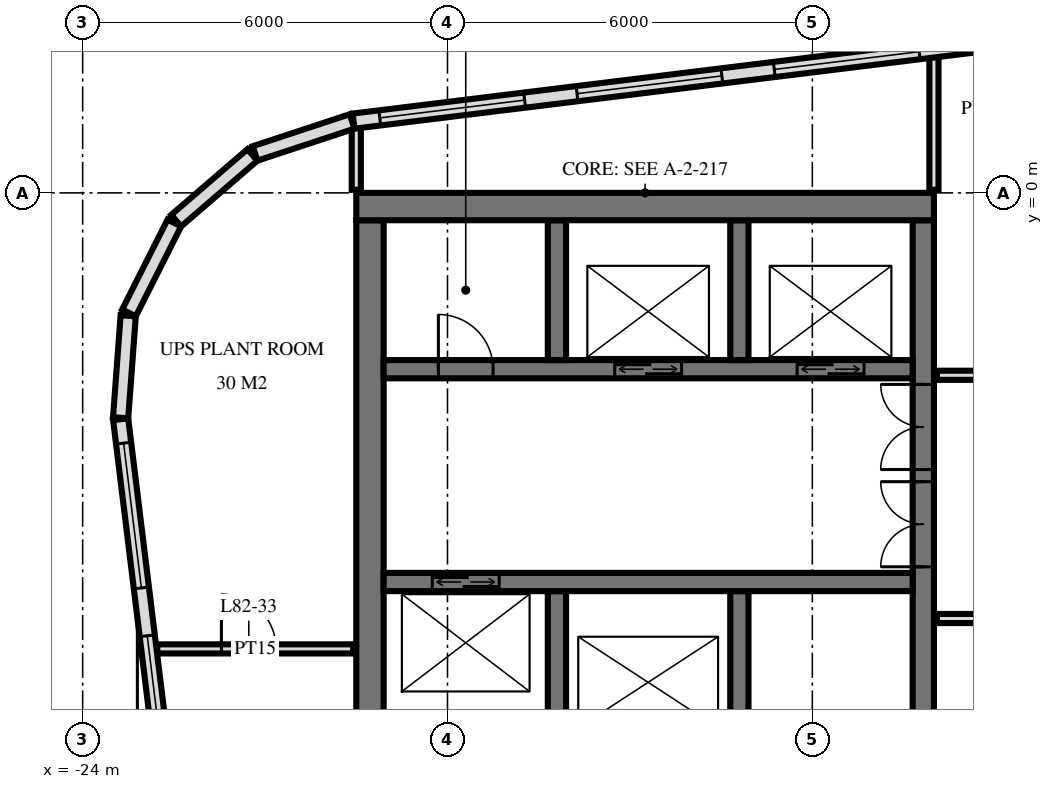
"""IFC4 building model, lengths in metres.
Left out: names, types, materials, properties, quantities, classifications, styles, units other than length and angle.
Written with IfcOpenShell. Run it as: python <this file> out.ifc"""

import sys

from ifc_helpers import new_model, si_unit, direction, frame, frame_2d, origin, place, context, subcontext, project, spatial, rectangle, extrude, element, fill, save


model = new_model("IFC4")
c1 = context("Model", 3, precision=1e-05, world=origin(), true_north=direction((0.0, 1.0)))
c2 = subcontext(c1, "Body", "Model", "MODEL_VIEW")
j1 = project(units=[si_unit("LENGTHUNIT", "METRE"), si_unit("PLANEANGLEUNIT", "RADIAN")], contexts=[c1])
p1 = place(None, origin())
s1 = spatial("IfcSite", under=j1, at=p1, CompositionType="ELEMENT")
p2 = place(p1, origin())
s2 = spatial("IfcBuilding", under=s1, at=p2, CompositionType="ELEMENT")
p3 = place(p2, frame((0.0, 0.0, 308.6)))
s3 = spatial("IfcBuildingStorey", under=s2, at=p3, CompositionType="ELEMENT", Elevation=308.6)
p4 = place(p3, frame((-19.5, -0.225, 0.0), z_axis=(0.0, 0.0, 1.0), x_axis=(1.0, 0.0, 0.0)))
e1 = element("IfcWall", 1, at=p4, inside=s3, PredefinedType="SHEAR", context=c2, shape_type="SweptSolid", body=[
    extrude(rectangle(XDim=9.5, YDim=0.45, at=frame_2d((4.75, 0.0))), origin(), (0.0, 0.0, 1.0), 6.0),
])
p5 = place(p3, frame((-10.175, -14.55, 0.0), z_axis=(0.0, 0.0, 1.0), x_axis=(0.0, 1.0, 0.0)))
e2 = element("IfcWall", 2, at=p5, inside=s3, PredefinedType="SHEAR", context=c2, shape_type="SweptSolid", body=[
    extrude(rectangle(XDim=14.1, YDim=0.35, at=frame_2d((7.05, 0.0))), origin(), (0.0, 0.0, 1.0), 6.0),
])
p6 = place(p5, frame((8.4, 0.0, 0.0)))
e3 = element("IfcOpeningElement", 3, at=p6, cuts=e2, PredefinedType="OPENING", context=c2, shape_type="SweptSolid", body=[
    extrude(rectangle(XDim=1.4, YDim=2.4, at=frame_2d((0.7, 1.2))), frame((0.0, 0.185, 0.0), z_axis=(0.0, -1.0, 0.0), x_axis=(1.0, 0.0, 0.0)), (0.0, 0.0, 1.0), 0.37),
])
p7 = place(p5, frame((10.0, 0.0, 0.0)))
e4 = element("IfcOpeningElement", 4, at=p7, cuts=e2, PredefinedType="OPENING", context=c2, shape_type="SweptSolid", body=[
    extrude(rectangle(XDim=1.4, YDim=2.4, at=frame_2d((0.7, 1.2))), frame((0.0, 0.185, 0.0), z_axis=(0.0, -1.0, 0.0), x_axis=(1.0, 0.0, 0.0)), (0.0, 0.0, 1.0), 0.37),
])
p8 = place(p5, frame((4.0, 0.0, 0.0)))
e5 = element("IfcOpeningElement", 5, at=p8, cuts=e2, PredefinedType="OPENING", context=c2, shape_type="SweptSolid", body=[
    extrude(rectangle(XDim=1.2, YDim=2.1, at=frame_2d((0.6, 1.05))), frame((0.0, 0.185, 0.0), z_axis=(0.0, -1.0, 0.0), x_axis=(1.0, 0.0, 0.0)), (0.0, 0.0, 1.0), 0.37),
])
p9 = place(p3, frame((-19.275, -14.55, 0.0), z_axis=(0.0, 0.0, 1.0), x_axis=(0.0, 1.0, 0.0)))
e6 = element("IfcWall", 6, at=p9, inside=s3, PredefinedType="SHEAR", context=c2, shape_type="SweptSolid", body=[
    extrude(rectangle(XDim=14.1, YDim=0.45, at=frame_2d((7.05, 0.0))), origin(), (0.0, 0.0, 1.0), 6.0),
])
p10 = place(p3, frame((-19.05, -2.9, 0.0), z_axis=(0.0, 0.0, 1.0), x_axis=(1.0, 0.0, 0.0)))
e7 = element("IfcWall", 7, at=p10, inside=s3, PredefinedType="SHEAR", context=c2, shape_type="SweptSolid", body=[
    extrude(rectangle(XDim=8.7, YDim=0.3, at=frame_2d((4.35, 0.0))), origin(), (0.0, 0.0, 1.0), 6.0),
])
p11 = place(p10, frame((6.8, 0.0, 0.0)))
e8 = element("IfcOpeningElement", 8, at=p11, cuts=e7, PredefinedType="OPENING", context=c2, shape_type="SweptSolid", body=[
    extrude(rectangle(XDim=1.1, YDim=2.1, at=frame_2d((0.55, 1.05))), frame((0.0, 0.16, 0.0), z_axis=(0.0, -1.0, 0.0), x_axis=(1.0, 0.0, 0.0)), (0.0, 0.0, 1.0), 0.32),
])
p12 = place(p10, frame((3.8, 0.0, 0.0)))
e9 = element("IfcOpeningElement", 9, at=p12, cuts=e7, PredefinedType="OPENING", context=c2, shape_type="SweptSolid", body=[
    extrude(rectangle(XDim=1.1, YDim=2.1, at=frame_2d((0.55, 1.05))), frame((0.0, 0.16, 0.0), z_axis=(0.0, -1.0, 0.0), x_axis=(1.0, 0.0, 0.0)), (0.0, 0.0, 1.0), 0.32),
])
p13 = place(p10, frame((0.9, 0.0, 0.0)))
e10 = element("IfcOpeningElement", 10, at=p13, cuts=e7, PredefinedType="OPENING", context=c2, shape_type="SweptSolid", body=[
    extrude(rectangle(XDim=0.9, YDim=2.1, at=frame_2d((0.45, 1.05))), frame((0.0, 0.16, 0.0), z_axis=(0.0, -1.0, 0.0), x_axis=(1.0, 0.0, 0.0)), (0.0, 0.0, 1.0), 0.32),
])
p14 = place(p3, frame((-19.05, -6.4, 0.0), z_axis=(0.0, 0.0, 1.0), x_axis=(1.0, 0.0, 0.0)))
e11 = element("IfcWall", 11, at=p14, inside=s3, PredefinedType="SHEAR", context=c2, shape_type="SweptSolid", body=[
    extrude(rectangle(XDim=8.7, YDim=0.3, at=frame_2d((4.35, 0.0))), origin(), (0.0, 0.0, 1.0), 6.0),
])
p15 = place(p14, frame((0.8, 0.0, 0.0)))
e12 = element("IfcOpeningElement", 12, at=p15, cuts=e11, PredefinedType="OPENING", context=c2, shape_type="SweptSolid", body=[
    extrude(rectangle(XDim=1.1, YDim=2.1, at=frame_2d((0.55, 1.05))), frame((0.0, 0.16, 0.0), z_axis=(0.0, -1.0, 0.0), x_axis=(1.0, 0.0, 0.0)), (0.0, 0.0, 1.0), 0.32),
])
for number, where, z_axis, x_axis in (
    (13, (-13.2, -2.75, 0.0), (0.0, 0.0, 1.0), (0.0, 1.0, 0.0)),
    (14, (-13.2, -8.85, 0.0), (0.0, 0.0, 1.0), (0.0, 1.0, 0.0)),
    (15, (-16.2, -2.75, 0.0), (0.0, 0.0, 1.0), (0.0, 1.0, 0.0)),
    (16, (-16.2, -8.85, 0.0), (0.0, 0.0, 1.0), (0.0, 1.0, 0.0)),
):
    element("IfcWall", number, at=place(p3, frame(where, z_axis=z_axis, x_axis=x_axis)), inside=s3, PredefinedType="SHEAR", context=c2, shape_type="SweptSolid", body=[
        extrude(rectangle(XDim=2.3, YDim=0.3, at=frame_2d((1.15, 0.0))), origin(), (0.0, 0.0, 1.0), 6.0),
    ])
p16 = place(p3, frame((16.138, 5.561, 0.0), z_axis=(0.0, 0.0, 1.0), x_axis=(-0.992546726876, -0.121864658405, 0.0)))
e17 = element("IfcWall", 17, at=p16, inside=s3, PredefinedType="SOLIDWALL", context=c2, shape_type="SweptSolid", body=[
    extrude(rectangle(XDim=35.951, YDim=0.25, at=frame_2d((17.975, 0.0))), origin(), (0.0, 0.0, 1.0), 5.72),
])
p17 = place(p16, frame((0.434, 0.0, 0.858)))
e18 = element("IfcOpeningElement", 18, at=p17, cuts=e17, PredefinedType="OPENING", context=c2, shape_type="SweptSolid", body=[
    extrude(rectangle(XDim=2.4, YDim=3.6, at=frame_2d((1.2, 1.8))), frame((0.0, 0.135, 0.0), z_axis=(0.0, -1.0, 0.0), x_axis=(1.0, 0.0, 0.0)), (0.0, 0.0, 1.0), 0.27),
])
p18 = place(p16, frame((3.702, 0.0, 0.858)))
e19 = element("IfcOpeningElement", 19, at=p18, cuts=e17, PredefinedType="OPENING", context=c2, shape_type="SweptSolid", body=[
    extrude(rectangle(XDim=2.4, YDim=3.6, at=frame_2d((1.2, 1.8))), frame((0.0, 0.135, 0.0), z_axis=(0.0, -1.0, 0.0), x_axis=(1.0, 0.0, 0.0)), (0.0, 0.0, 1.0), 0.27),
])
p19 = place(p16, frame((6.971, 0.0, 0.858)))
e20 = element("IfcOpeningElement", 20, at=p19, cuts=e17, PredefinedType="OPENING", context=c2, shape_type="SweptSolid", body=[
    extrude(rectangle(XDim=2.4, YDim=3.6, at=frame_2d((1.2, 1.8))), frame((0.0, 0.135, 0.0), z_axis=(0.0, -1.0, 0.0), x_axis=(1.0, 0.0, 0.0)), (0.0, 0.0, 1.0), 0.27),
])
p20 = place(p16, frame((10.239, 0.0, 0.858)))
e21 = element("IfcOpeningElement", 21, at=p20, cuts=e17, PredefinedType="OPENING", context=c2, shape_type="SweptSolid", body=[
    extrude(rectangle(XDim=2.4, YDim=3.6, at=frame_2d((1.2, 1.8))), frame((0.0, 0.135, 0.0), z_axis=(0.0, -1.0, 0.0), x_axis=(1.0, 0.0, 0.0)), (0.0, 0.0, 1.0), 0.27),
])
p21 = place(p16, frame((13.507, 0.0, 0.858)))
e22 = element("IfcOpeningElement", 22, at=p21, cuts=e17, PredefinedType="OPENING", context=c2, shape_type="SweptSolid", body=[
    extrude(rectangle(XDim=2.4, YDim=3.6, at=frame_2d((1.2, 1.8))), frame((0.0, 0.135, 0.0), z_axis=(0.0, -1.0, 0.0), x_axis=(1.0, 0.0, 0.0)), (0.0, 0.0, 1.0), 0.27),
])
p22 = place(p16, frame((16.775, 0.0, 0.858)))
e23 = element("IfcOpeningElement", 23, at=p22, cuts=e17, PredefinedType="OPENING", context=c2, shape_type="SweptSolid", body=[
    extrude(rectangle(XDim=2.4, YDim=3.6, at=frame_2d((1.2, 1.8))), frame((0.0, 0.135, 0.0), z_axis=(0.0, -1.0, 0.0), x_axis=(1.0, 0.0, 0.0)), (0.0, 0.0, 1.0), 0.27),
])
p23 = place(p16, frame((20.044, 0.0, 0.858)))
e24 = element("IfcOpeningElement", 24, at=p23, cuts=e17, PredefinedType="OPENING", context=c2, shape_type="SweptSolid", body=[
    extrude(rectangle(XDim=2.4, YDim=3.6, at=frame_2d((1.2, 1.8))), frame((0.0, 0.135, 0.0), z_axis=(0.0, -1.0, 0.0), x_axis=(1.0, 0.0, 0.0)), (0.0, 0.0, 1.0), 0.27),
])
p24 = place(p16, frame((23.312, 0.0, 0.858)))
e25 = element("IfcOpeningElement", 25, at=p24, cuts=e17, PredefinedType="OPENING", context=c2, shape_type="SweptSolid", body=[
    extrude(rectangle(XDim=2.4, YDim=3.6, at=frame_2d((1.2, 1.8))), frame((0.0, 0.135, 0.0), z_axis=(0.0, -1.0, 0.0), x_axis=(1.0, 0.0, 0.0)), (0.0, 0.0, 1.0), 0.27),
])
p25 = place(p16, frame((26.58, 0.0, 0.858)))
e26 = element("IfcOpeningElement", 26, at=p25, cuts=e17, PredefinedType="OPENING", context=c2, shape_type="SweptSolid", body=[
    extrude(rectangle(XDim=2.4, YDim=3.6, at=frame_2d((1.2, 1.8))), frame((0.0, 0.135, 0.0), z_axis=(0.0, -1.0, 0.0), x_axis=(1.0, 0.0, 0.0)), (0.0, 0.0, 1.0), 0.27),
])
p26 = place(p16, frame((29.848, 0.0, 0.858)))
e27 = element("IfcOpeningElement", 27, at=p26, cuts=e17, PredefinedType="OPENING", context=c2, shape_type="SweptSolid", body=[
    extrude(rectangle(XDim=2.4, YDim=3.6, at=frame_2d((1.2, 1.8))), frame((0.0, 0.135, 0.0), z_axis=(0.0, -1.0, 0.0), x_axis=(1.0, 0.0, 0.0)), (0.0, 0.0, 1.0), 0.27),
])
p27 = place(p16, frame((33.117, 0.0, 0.858)))
e28 = element("IfcOpeningElement", 28, at=p27, cuts=e17, PredefinedType="OPENING", context=c2, shape_type="SweptSolid", body=[
    extrude(rectangle(XDim=2.4, YDim=3.6, at=frame_2d((1.2, 1.8))), frame((0.0, 0.135, 0.0), z_axis=(0.0, -1.0, 0.0), x_axis=(1.0, 0.0, 0.0)), (0.0, 0.0, 1.0), 0.27),
])
p28 = place(p3, frame((-19.568, 1.175, 0.0), z_axis=(0.0, 0.0, 1.0), x_axis=(-0.949694735798, -0.313177120489, 0.0)))
e29 = element("IfcWall", 29, at=p28, inside=s3, PredefinedType="SOLIDWALL", context=c2, shape_type="SweptSolid", body=[
    extrude(rectangle(XDim=1.681, YDim=0.25, at=frame_2d((0.841, 0.0))), origin(), (0.0, 0.0, 1.0), 5.72),
])
p29 = place(p3, frame((-21.208, 0.624, 0.0), z_axis=(0.0, 0.0, 1.0), x_axis=(-0.757568315466, -0.652755886531, 0.0)))
e30 = element("IfcWall", 30, at=p29, inside=s3, PredefinedType="SOLIDWALL", context=c2, shape_type="SweptSolid", body=[
    extrude(rectangle(XDim=1.656, YDim=0.25, at=frame_2d((0.828, 0.0))), origin(), (0.0, 0.0, 1.0), 5.72),
])
p30 = place(p3, frame((-22.493, -0.495, 0.0), z_axis=(0.0, 0.0, 1.0), x_axis=(-0.449982385812, -0.893037430604, 0.0)))
e31 = element("IfcWall", 31, at=p30, inside=s3, PredefinedType="SOLIDWALL", context=c2, shape_type="SweptSolid", body=[
    extrude(rectangle(XDim=1.656, YDim=0.25, at=frame_2d((0.828, 0.0))), origin(), (0.0, 0.0, 1.0), 5.72),
])
p31 = place(p3, frame((-23.251, -2.021, 0.0), z_axis=(0.0, 0.0, 1.0), x_axis=(-0.074053534713, -0.997254267475, 0.0)))
e32 = element("IfcWall", 32, at=p31, inside=s3, PredefinedType="SOLIDWALL", context=c2, shape_type="SweptSolid", body=[
    extrude(rectangle(XDim=1.681, YDim=0.25, at=frame_2d((0.841, 0.0))), origin(), (0.0, 0.0, 1.0), 5.72),
])
p32 = place(p3, frame((-23.375, -3.723, 0.0), z_axis=(0.0, 0.0, 1.0), x_axis=(0.121852870635, -0.992548174104, 0.0)))
e33 = element("IfcWall", 33, at=p32, inside=s3, PredefinedType="SOLIDWALL", context=c2, shape_type="SweptSolid", body=[
    extrude(rectangle(XDim=11.529, YDim=0.25, at=frame_2d((5.764, 0.0))), origin(), (0.0, 0.0, 1.0), 5.72),
])
p33 = place(p32, frame((0.396, 0.0, 1.005)))
e34 = element("IfcOpeningElement", 34, at=p33, cuts=e33, PredefinedType="OPENING", context=c2, shape_type="SweptSolid", body=[
    extrude(rectangle(XDim=2.4, YDim=3.6, at=frame_2d((1.2, 1.8))), frame((0.0, 0.135, 0.0), z_axis=(0.0, -1.0, 0.0), x_axis=(1.0, 0.0, 0.0)), (0.0, 0.0, 1.0), 0.27),
])
p34 = place(p32, frame((3.588, 0.0, 1.005)))
e35 = element("IfcOpeningElement", 35, at=p34, cuts=e33, PredefinedType="OPENING", context=c2, shape_type="SweptSolid", body=[
    extrude(rectangle(XDim=2.4, YDim=3.6, at=frame_2d((1.2, 1.8))), frame((0.0, 0.135, 0.0), z_axis=(0.0, -1.0, 0.0), x_axis=(1.0, 0.0, 0.0)), (0.0, 0.0, 1.0), 0.27),
])
p35 = place(p32, frame((6.78, 0.0, 1.005)))
e36 = element("IfcOpeningElement", 36, at=p35, cuts=e33, PredefinedType="OPENING", context=c2, shape_type="SweptSolid", body=[
    extrude(rectangle(XDim=2.4, YDim=3.6, at=frame_2d((1.2, 1.8))), frame((0.0, 0.135, 0.0), z_axis=(0.0, -1.0, 0.0), x_axis=(1.0, 0.0, 0.0)), (0.0, 0.0, 1.0), 0.27),
])
p36 = place(p3, frame((-10.0, 0.05, 0.0), z_axis=(0.0, 0.0, 1.0), x_axis=(0.0, 1.0, 0.0)))
e37 = element("IfcWall", 37, at=p36, inside=s3, PredefinedType="PLUMBINGWALL", context=c2, shape_type="SweptSolid", body=[
    extrude(rectangle(XDim=2.247, YDim=0.15, at=frame_2d((1.123, 0.0))), origin(), (0.0, 0.0, 1.0), 5.7),
])
p37 = place(p3, frame((-19.5, 0.05, 0.0), z_axis=(0.0, 0.0, 1.0), x_axis=(0.0, 1.0, 0.0)))
e38 = element("IfcWall", 38, at=p37, inside=s3, PredefinedType="PARTITIONING", context=c2, shape_type="SweptSolid", body=[
    extrude(rectangle(XDim=1.08, YDim=0.15, at=frame_2d((0.54, 0.0))), origin(), (0.0, 0.0, 1.0), 5.7),
])
p38 = place(p3, frame((-22.773, -7.5, 0.0), z_axis=(0.0, 0.0, 1.0), x_axis=(1.0, 0.0, 0.0)))
e39 = element("IfcWall", 39, at=p38, inside=s3, PredefinedType="PARTITIONING", context=c2, shape_type="SweptSolid", body=[
    extrude(rectangle(XDim=3.223, YDim=0.15, at=frame_2d((1.612, 0.0))), origin(), (0.0, 0.0, 1.0), 5.7),
])
p39 = place(p38, frame((1.055, 0.0, 0.0)))
e40 = element("IfcOpeningElement", 40, at=p39, cuts=e39, PredefinedType="OPENING", context=c2, shape_type="SweptSolid", body=[
    extrude(rectangle(XDim=0.9, YDim=2.1, at=frame_2d((0.45, 1.05))), frame((0.0, 0.085, 0.0), z_axis=(0.0, -1.0, 0.0), x_axis=(1.0, 0.0, 0.0)), (0.0, 0.0, 1.0), 0.17),
])
p40 = place(p3, frame((-9.95, -7.0, 0.0), z_axis=(0.0, 0.0, 1.0), x_axis=(1.0, 0.0, 0.0)))
e41 = element("IfcWall", 41, at=p40, inside=s3, PredefinedType="PARTITIONING", context=c2, shape_type="SweptSolid", body=[
    extrude(rectangle(XDim=19.9, YDim=0.15, at=frame_2d((9.95, 0.0))), origin(), (0.0, 0.0, 1.0), 5.7),
])
p41 = place(p40, frame((9.45, 0.0, 0.0)))
e42 = element("IfcOpeningElement", 42, at=p41, cuts=e41, PredefinedType="OPENING", context=c2, shape_type="SweptSolid", body=[
    extrude(rectangle(XDim=1.0, YDim=2.1, at=frame_2d((0.5, 1.05))), frame((0.0, 0.085, 0.0), z_axis=(0.0, -1.0, 0.0), x_axis=(1.0, 0.0, 0.0)), (0.0, 0.0, 1.0), 0.17),
])
p42 = place(p40, frame((2.0, 0.0, 0.0)))
e43 = element("IfcOpeningElement", 43, at=p42, cuts=e41, PredefinedType="OPENING", context=c2, shape_type="SweptSolid", body=[
    extrude(rectangle(XDim=1.0, YDim=2.1, at=frame_2d((0.5, 1.05))), frame((0.0, 0.085, 0.0), z_axis=(0.0, -1.0, 0.0), x_axis=(1.0, 0.0, 0.0)), (0.0, 0.0, 1.0), 0.17),
])
p43 = place(p3, frame((-9.95, -3.0, 0.0), z_axis=(0.0, 0.0, 1.0), x_axis=(1.0, 0.0, 0.0)))
e44 = element("IfcWall", 44, at=p43, inside=s3, PredefinedType="PARTITIONING", context=c2, shape_type="SweptSolid", body=[
    extrude(rectangle(XDim=19.9, YDim=0.15, at=frame_2d((9.95, 0.0))), origin(), (0.0, 0.0, 1.0), 5.7),
])
p44 = place(p43, frame((0.95, 0.0, 0.0)))
e45 = element("IfcOpeningElement", 45, at=p44, cuts=e44, PredefinedType="OPENING", context=c2, shape_type="SweptSolid", body=[
    extrude(rectangle(XDim=1.0, YDim=2.1, at=frame_2d((0.5, 1.05))), frame((0.0, 0.085, 0.0), z_axis=(0.0, -1.0, 0.0), x_axis=(1.0, 0.0, 0.0)), (0.0, 0.0, 1.0), 0.17),
])
p45 = place(p43, frame((3.7, 0.0, 0.0)))
e46 = element("IfcOpeningElement", 46, at=p45, cuts=e44, PredefinedType="OPENING", context=c2, shape_type="SweptSolid", body=[
    extrude(rectangle(XDim=1.0, YDim=2.1, at=frame_2d((0.5, 1.05))), frame((0.0, 0.085, 0.0), z_axis=(0.0, -1.0, 0.0), x_axis=(1.0, 0.0, 0.0)), (0.0, 0.0, 1.0), 0.17),
])
p46 = place(p43, frame((7.0, 0.0, 0.0)))
e47 = element("IfcOpeningElement", 47, at=p46, cuts=e44, PredefinedType="OPENING", context=c2, shape_type="SweptSolid", body=[
    extrude(rectangle(XDim=1.0, YDim=2.1, at=frame_2d((0.5, 1.05))), frame((0.0, 0.085, 0.0), z_axis=(0.0, -1.0, 0.0), x_axis=(1.0, 0.0, 0.0)), (0.0, 0.0, 1.0), 0.17),
])
p47 = place(p43, frame((16.9, 0.0, 0.0)))
e48 = element("IfcOpeningElement", 48, at=p47, cuts=e44, PredefinedType="OPENING", context=c2, shape_type="SweptSolid", body=[
    extrude(rectangle(XDim=1.0, YDim=2.1, at=frame_2d((0.5, 1.05))), frame((0.0, 0.085, 0.0), z_axis=(0.0, -1.0, 0.0), x_axis=(1.0, 0.0, 0.0)), (0.0, 0.0, 1.0), 0.17),
])
p48 = place(p24, origin())
e49 = element("IfcWindow", 49, at=p48, inside=s3, PartitioningType="SINGLE_PANEL", PredefinedType="USERDEFINED", context=c2, shape_type="SweptSolid", body=[
    extrude(rectangle(XDim=2.4, YDim=3.6, at=frame_2d((1.2, 1.8))), frame((0.0, 0.125, 0.0), z_axis=(0.0, -1.0, 0.0), x_axis=(1.0, 0.0, 0.0)), (0.0, 0.0, 1.0), 0.06),
])
fill(e25, e49)
p49 = place(p25, origin())
e50 = element("IfcWindow", 50, at=p49, inside=s3, PartitioningType="SINGLE_PANEL", PredefinedType="USERDEFINED", context=c2, shape_type="SweptSolid", body=[
    extrude(rectangle(XDim=2.4, YDim=3.6, at=frame_2d((1.2, 1.8))), frame((0.0, 0.125, 0.0), z_axis=(0.0, -1.0, 0.0), x_axis=(1.0, 0.0, 0.0)), (0.0, 0.0, 1.0), 0.06),
])
fill(e26, e50)
p50 = place(p26, origin())
e51 = element("IfcWindow", 51, at=p50, inside=s3, PartitioningType="SINGLE_PANEL", PredefinedType="USERDEFINED", context=c2, shape_type="SweptSolid", body=[
    extrude(rectangle(XDim=2.4, YDim=3.6, at=frame_2d((1.2, 1.8))), frame((0.0, 0.125, 0.0), z_axis=(0.0, -1.0, 0.0), x_axis=(1.0, 0.0, 0.0)), (0.0, 0.0, 1.0), 0.06),
])
fill(e27, e51)
p51 = place(p27, origin())
e52 = element("IfcWindow", 52, at=p51, inside=s3, PartitioningType="SINGLE_PANEL", PredefinedType="USERDEFINED", context=c2, shape_type="SweptSolid", body=[
    extrude(rectangle(XDim=2.4, YDim=3.6, at=frame_2d((1.2, 1.8))), frame((0.0, 0.125, 0.0), z_axis=(0.0, -1.0, 0.0), x_axis=(1.0, 0.0, 0.0)), (0.0, 0.0, 1.0), 0.06),
])
fill(e28, e52)
p52 = place(p33, origin())
e53 = element("IfcWindow", 53, at=p52, inside=s3, PartitioningType="SINGLE_PANEL", PredefinedType="USERDEFINED", context=c2, shape_type="SweptSolid", body=[
    extrude(rectangle(XDim=2.4, YDim=3.6, at=frame_2d((1.2, 1.8))), frame((0.0, 0.03, 0.0), z_axis=(0.0, -1.0, 0.0), x_axis=(1.0, 0.0, 0.0)), (0.0, 0.0, 1.0), 0.06),
])
fill(e34, e53)
p53 = place(p34, origin())
e54 = element("IfcWindow", 54, at=p53, inside=s3, PartitioningType="SINGLE_PANEL", PredefinedType="USERDEFINED", context=c2, shape_type="SweptSolid", body=[
    extrude(rectangle(XDim=2.4, YDim=3.6, at=frame_2d((1.2, 1.8))), frame((0.0, 0.03, 0.0), z_axis=(0.0, -1.0, 0.0), x_axis=(1.0, 0.0, 0.0)), (0.0, 0.0, 1.0), 0.06),
])
fill(e35, e54)
p54 = place(p11, origin())
e55 = element("IfcDoor", 55, at=p54, inside=s3, OperationType="DOUBLE_DOOR_SLIDING", PredefinedType="USERDEFINED", context=c2, shape_type="SweptSolid", body=[
    extrude(rectangle(XDim=1.1, YDim=2.1, at=frame_2d((0.55, 1.05))), frame((0.0, 0.025, 0.0), z_axis=(0.0, -1.0, 0.0), x_axis=(1.0, 0.0, 0.0)), (0.0, 0.0, 1.0), 0.05),
])
fill(e8, e55)
p55 = place(p12, origin())
e56 = element("IfcDoor", 56, at=p55, inside=s3, OperationType="DOUBLE_DOOR_SLIDING", PredefinedType="USERDEFINED", context=c2, shape_type="SweptSolid", body=[
    extrude(rectangle(XDim=1.1, YDim=2.1, at=frame_2d((0.55, 1.05))), frame((0.0, 0.025, 0.0), z_axis=(0.0, -1.0, 0.0), x_axis=(1.0, 0.0, 0.0)), (0.0, 0.0, 1.0), 0.05),
])
fill(e9, e56)
p56 = place(p15, origin())
e57 = element("IfcDoor", 57, at=p56, inside=s3, OperationType="DOUBLE_DOOR_SLIDING", PredefinedType="USERDEFINED", context=c2, shape_type="SweptSolid", body=[
    extrude(rectangle(XDim=1.1, YDim=2.1, at=frame_2d((0.55, 1.05))), frame((0.0, 0.025, 0.0), z_axis=(0.0, -1.0, 0.0), x_axis=(1.0, 0.0, 0.0)), (0.0, 0.0, 1.0), 0.05),
])
fill(e12, e57)
p57 = place(p6, origin())
e58 = element("IfcDoor", 58, at=p57, inside=s3, OperationType="DOUBLE_DOOR_SINGLE_SWING", PredefinedType="DOOR", context=c2, shape_type="SweptSolid", body=[
    extrude(rectangle(XDim=1.4, YDim=2.4, at=frame_2d((0.7, 1.2))), frame((0.0, 0.025, 0.0), z_axis=(0.0, -1.0, 0.0), x_axis=(1.0, 0.0, 0.0)), (0.0, 0.0, 1.0), 0.05),
])
fill(e3, e58)
p58 = place(p7, origin())
e59 = element("IfcDoor", 59, at=p58, inside=s3, OperationType="DOUBLE_DOOR_SINGLE_SWING", PredefinedType="DOOR", context=c2, shape_type="SweptSolid", body=[
    extrude(rectangle(XDim=1.4, YDim=2.4, at=frame_2d((0.7, 1.2))), frame((0.0, 0.025, 0.0), z_axis=(0.0, -1.0, 0.0), x_axis=(1.0, 0.0, 0.0)), (0.0, 0.0, 1.0), 0.05),
])
fill(e4, e59)
p59 = place(p13, origin())
e60 = element("IfcDoor", 60, at=p59, inside=s3, OperationType="SINGLE_SWING_RIGHT", PredefinedType="DOOR", context=c2, shape_type="SweptSolid", body=[
    extrude(rectangle(XDim=0.9, YDim=2.1, at=frame_2d((0.45, 1.05))), frame((0.0, 0.025, 0.0), z_axis=(0.0, -1.0, 0.0), x_axis=(1.0, 0.0, 0.0)), (0.0, 0.0, 1.0), 0.05),
])
fill(e10, e60)
p60 = place(p39, origin())
e61 = element("IfcDoor", 61, at=p60, inside=s3, OperationType="SINGLE_SWING_RIGHT", PredefinedType="DOOR", context=c2, shape_type="SweptSolid", body=[
    extrude(rectangle(XDim=0.9, YDim=2.1, at=frame_2d((0.45, 1.05))), frame((0.0, 0.025, 0.0), z_axis=(0.0, -1.0, 0.0), x_axis=(1.0, 0.0, 0.0)), (0.0, 0.0, 1.0), 0.05),
])
fill(e40, e61)
save(model, sys.argv[1])
